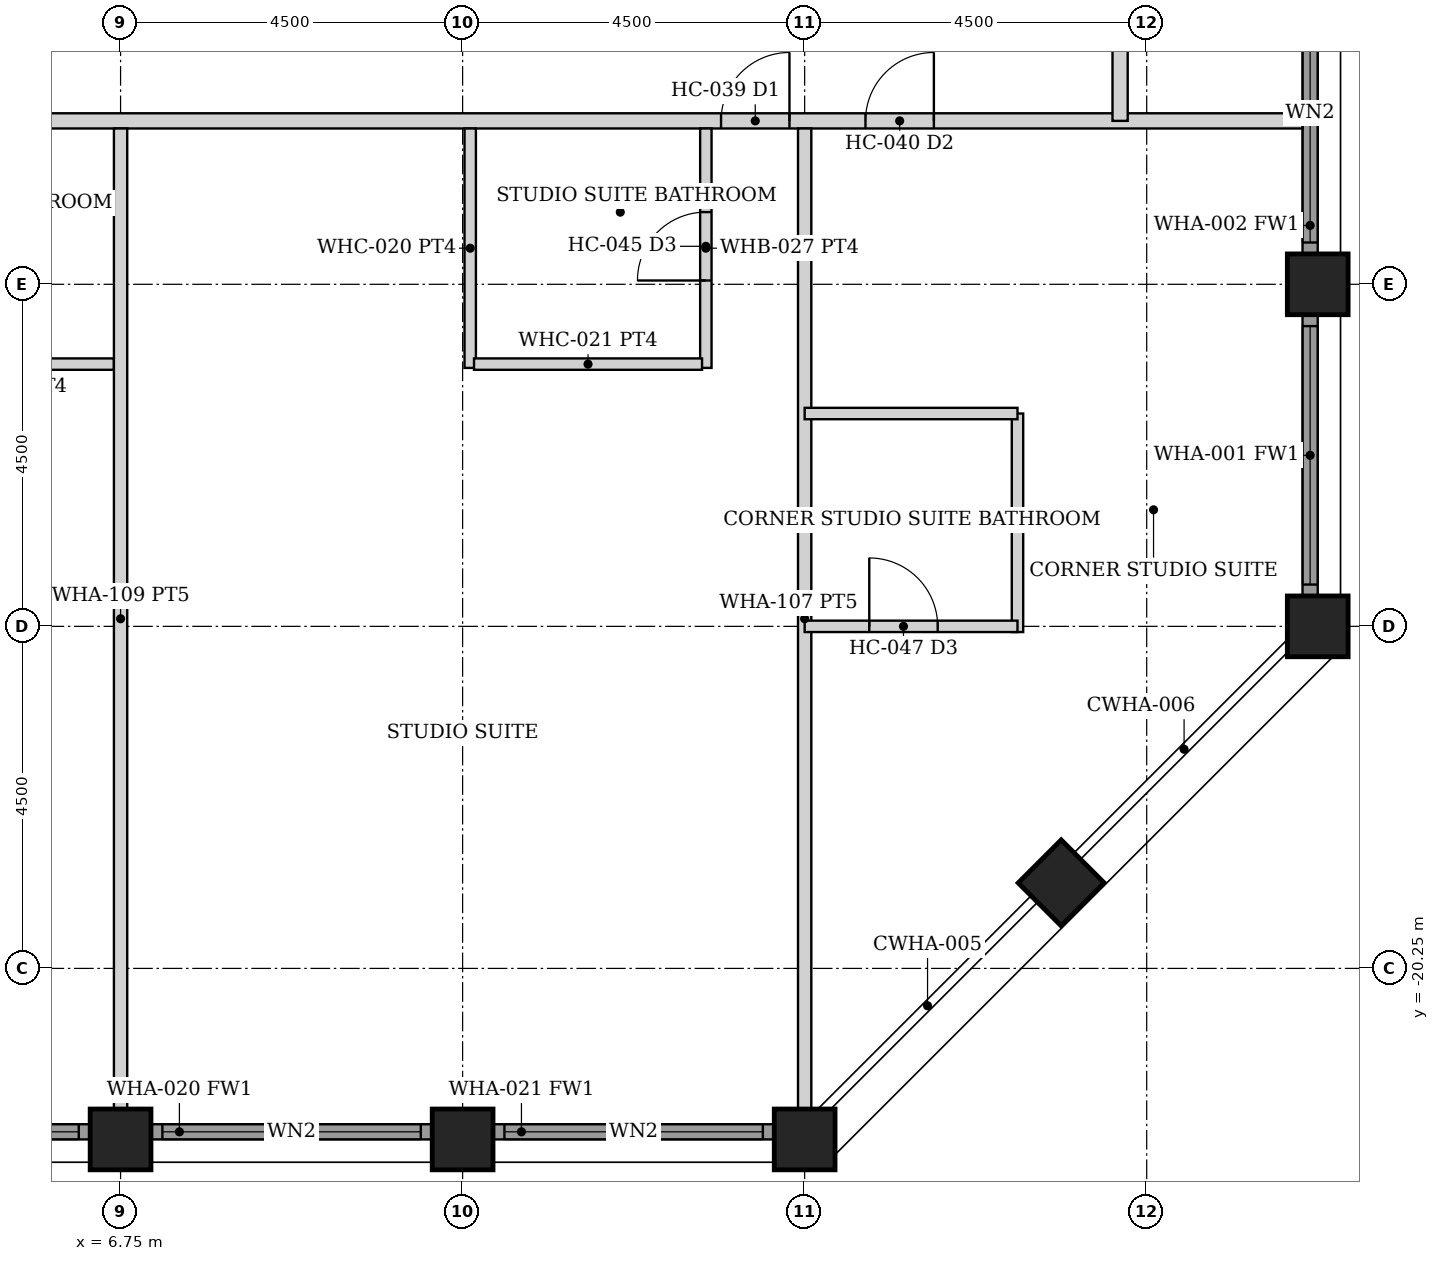
"""IFC4 building model, lengths in metres.
Left out: names, types, materials, properties, quantities, classifications, styles, units other than length and angle.
Written with IfcOpenShell. Run it as: python <this file> out.ifc"""

import sys

from ifc_helpers import new_model, si_unit, direction, frame, frame_2d, origin, origin_2d, place, context, subcontext, project, spatial, rectangle, hollow_rectangle, extrude, element, fill, save


model = new_model("IFC4")
c1 = context("Model", 3, precision=1e-05, world=origin(), true_north=direction((0.0, 1.0)))
c2 = subcontext(c1, "Body", "Model", "MODEL_VIEW")
j1 = project(units=[si_unit("LENGTHUNIT", "METRE"), si_unit("PLANEANGLEUNIT", "RADIAN")], contexts=[c1])
p1 = place(None, origin())
s1 = spatial("IfcSite", under=j1, at=p1, CompositionType="ELEMENT")
p2 = place(p1, origin())
s2 = spatial("IfcBuilding", under=s1, at=p2, CompositionType="ELEMENT")
p3 = place(p2, frame((0.0, 0.0, 140.0)))
s3 = spatial("IfcBuildingStorey", under=s2, at=p3, CompositionType="ELEMENT", Elevation=140.0)
for number, where, z_axis, x_axis in (
    (1, (22.5, -15.75, 0.0), (0.0, 0.0, 1.0), (1.0, 0.0, 0.0)),
    (2, (22.5, -11.25, 0.0), (0.0, 0.0, 1.0), (1.0, 0.0, 0.0)),
    (3, (6.75, -22.5, 0.0), (0.0, 0.0, 1.0), (0.0, 1.0, 0.0)),
    (4, (11.25, -22.5, 0.0), (0.0, 0.0, 1.0), (0.0, 1.0, 0.0)),
    (5, (15.75, -22.5, 0.0), (0.0, 0.0, 1.0), (0.0, 1.0, 0.0)),
    (6, (19.125, -19.125, 0.0), (0.0, 0.0, 1.0), (0.707, -0.707, 0.0)),
):
    element("IfcColumn", number, at=place(p3, frame(where, z_axis=z_axis, x_axis=x_axis)), inside=s3, PredefinedType="COLUMN", context=c2, shape_type="SweptSolid", body=[
        extrude(hollow_rectangle(XDim=0.8, YDim=0.8, WallThickness=0.05, at=origin_2d()), origin(), (0.0, 0.0, 1.0), 3.6),
    ])
p4 = place(p3, frame((2.655, -22.4, 0.0), z_axis=(0.0, 0.0, 1.0), x_axis=(1.0, 0.0, 0.0)))
e7 = element("IfcWall", 7, at=p4, inside=s3, PredefinedType="SOLIDWALL", context=c2, shape_type="SweptSolid", body=[
    extrude(rectangle(XDim=3.69, YDim=0.2, at=frame_2d((1.845, 0.0))), origin(), (0.0, 0.0, 1.0), 2.479),
])
p5 = place(p4, frame((0.145, 0.0, 0.3)))
e8 = element("IfcOpeningElement", 8, at=p5, cuts=e7, PredefinedType="OPENING", context=c2, shape_type="SweptSolid", body=[
    extrude(rectangle(XDim=3.4, YDim=2.029, at=frame_2d((1.7, 1.015))), frame((0.0, 0.11, 0.0), z_axis=(0.0, -1.0, 0.0), x_axis=(1.0, 0.0, 0.0)), (0.0, 0.0, 1.0), 0.22),
])
p6 = place(p3, frame((7.155, -22.4, 0.0), z_axis=(0.0, 0.0, 1.0), x_axis=(1.0, 0.0, 0.0)))
e9 = element("IfcWall", 9, at=p6, inside=s3, PredefinedType="SOLIDWALL", context=c2, shape_type="SweptSolid", body=[
    extrude(rectangle(XDim=3.69, YDim=0.2, at=frame_2d((1.845, 0.0))), origin(), (0.0, 0.0, 1.0), 2.479),
])
p7 = place(p6, frame((0.145, 0.0, 0.3)))
e10 = element("IfcOpeningElement", 10, at=p7, cuts=e9, PredefinedType="OPENING", context=c2, shape_type="SweptSolid", body=[
    extrude(rectangle(XDim=3.4, YDim=2.029, at=frame_2d((1.7, 1.015))), frame((0.0, 0.11, 0.0), z_axis=(0.0, -1.0, 0.0), x_axis=(1.0, 0.0, 0.0)), (0.0, 0.0, 1.0), 0.22),
])
p8 = place(p3, frame((11.655, -22.4, 0.0), z_axis=(0.0, 0.0, 1.0), x_axis=(1.0, 0.0, 0.0)))
e11 = element("IfcWall", 11, at=p8, inside=s3, PredefinedType="SOLIDWALL", context=c2, shape_type="SweptSolid", body=[
    extrude(rectangle(XDim=3.69, YDim=0.2, at=frame_2d((1.845, 0.0))), origin(), (0.0, 0.0, 1.0), 2.479),
])
p9 = place(p8, frame((0.145, 0.0, 0.3)))
e12 = element("IfcOpeningElement", 12, at=p9, cuts=e11, PredefinedType="OPENING", context=c2, shape_type="SweptSolid", body=[
    extrude(rectangle(XDim=3.4, YDim=2.029, at=frame_2d((1.7, 1.015))), frame((0.0, 0.11, 0.0), z_axis=(0.0, -1.0, 0.0), x_axis=(1.0, 0.0, 0.0)), (0.0, 0.0, 1.0), 0.22),
])
p10 = place(p3, frame((22.4, -15.345, 0.0), z_axis=(0.0, 0.0, 1.0), x_axis=(0.0, 1.0, 0.0)))
e13 = element("IfcWall", 13, at=p10, inside=s3, PredefinedType="SOLIDWALL", context=c2, shape_type="SweptSolid", body=[
    extrude(rectangle(XDim=3.69, YDim=0.2, at=frame_2d((1.845, 0.0))), origin(), (0.0, 0.0, 1.0), 2.479),
])
p11 = place(p10, frame((0.145, 0.0, 0.3)))
e14 = element("IfcOpeningElement", 14, at=p11, cuts=e13, PredefinedType="OPENING", context=c2, shape_type="SweptSolid", body=[
    extrude(rectangle(XDim=3.4, YDim=2.029, at=frame_2d((1.7, 1.015))), frame((0.0, 0.11, 0.0), z_axis=(0.0, -1.0, 0.0), x_axis=(1.0, 0.0, 0.0)), (0.0, 0.0, 1.0), 0.22),
])
p12 = place(p3, frame((22.4, -10.845, 0.0), z_axis=(0.0, 0.0, 1.0), x_axis=(0.0, 1.0, 0.0)))
e15 = element("IfcWall", 15, at=p12, inside=s3, PredefinedType="SOLIDWALL", context=c2, shape_type="SweptSolid", body=[
    extrude(rectangle(XDim=3.69, YDim=0.2, at=frame_2d((1.845, 0.0))), origin(), (0.0, 0.0, 1.0), 2.479),
])
p13 = place(p12, frame((0.145, 0.0, 0.3)))
e16 = element("IfcOpeningElement", 16, at=p13, cuts=e15, PredefinedType="OPENING", context=c2, shape_type="SweptSolid", body=[
    extrude(rectangle(XDim=3.4, YDim=2.029, at=frame_2d((1.7, 1.015))), frame((0.0, 0.11, 0.0), z_axis=(0.0, -1.0, 0.0), x_axis=(1.0, 0.0, 0.0)), (0.0, 0.0, 1.0), 0.22),
])
p14 = place(p3, frame((-22.3, -9.1, 0.0), z_axis=(0.0, 0.0, 1.0), x_axis=(1.0, 0.0, 0.0)))
e17 = element("IfcWall", 17, at=p14, inside=s3, PredefinedType="PARTITIONING", context=c2, shape_type="SweptSolid", body=[
    extrude(rectangle(XDim=44.6, YDim=0.2, at=frame_2d((22.3, 0.0))), origin(), (0.0, 0.0, 1.0), 2.473),
])
p15 = place(p14, frame((6.75, 0.0, 0.0)))
e18 = element("IfcOpeningElement", 18, at=p15, cuts=e17, PredefinedType="OPENING", context=c2, shape_type="SweptSolid", body=[
    extrude(rectangle(XDim=0.9, YDim=2.1, at=frame_2d((0.45, 1.05))), frame((0.0, 0.11, 0.0), z_axis=(0.0, -1.0, 0.0), x_axis=(1.0, 0.0, 0.0)), (0.0, 0.0, 1.0), 0.22),
])
p16 = place(p14, frame((14.45, 0.0, 0.0)))
e19 = element("IfcOpeningElement", 19, at=p16, cuts=e17, PredefinedType="OPENING", context=c2, shape_type="SweptSolid", body=[
    extrude(rectangle(XDim=0.9, YDim=2.1, at=frame_2d((0.45, 1.05))), frame((0.0, 0.11, 0.0), z_axis=(0.0, -1.0, 0.0), x_axis=(1.0, 0.0, 0.0)), (0.0, 0.0, 1.0), 0.22),
])
p17 = place(p14, frame((15.75, 0.0, 0.0)))
e20 = element("IfcOpeningElement", 20, at=p17, cuts=e17, PredefinedType="OPENING", context=c2, shape_type="SweptSolid", body=[
    extrude(rectangle(XDim=0.9, YDim=2.1, at=frame_2d((0.45, 1.05))), frame((0.0, 0.11, 0.0), z_axis=(0.0, -1.0, 0.0), x_axis=(1.0, 0.0, 0.0)), (0.0, 0.0, 1.0), 0.22),
])
p18 = place(p14, frame((24.75, 0.0, 0.0)))
e21 = element("IfcOpeningElement", 21, at=p18, cuts=e17, PredefinedType="OPENING", context=c2, shape_type="SweptSolid", body=[
    extrude(rectangle(XDim=0.9, YDim=2.1, at=frame_2d((0.45, 1.05))), frame((0.0, 0.11, 0.0), z_axis=(0.0, -1.0, 0.0), x_axis=(1.0, 0.0, 0.0)), (0.0, 0.0, 1.0), 0.22),
])
p19 = place(p14, frame((36.95, 0.0, 0.0)))
e22 = element("IfcOpeningElement", 22, at=p19, cuts=e17, PredefinedType="OPENING", context=c2, shape_type="SweptSolid", body=[
    extrude(rectangle(XDim=0.9, YDim=2.1, at=frame_2d((0.45, 1.05))), frame((0.0, 0.11, 0.0), z_axis=(0.0, -1.0, 0.0), x_axis=(1.0, 0.0, 0.0)), (0.0, 0.0, 1.0), 0.22),
])
p20 = place(p14, frame((38.85, 0.0, 0.0)))
e23 = element("IfcOpeningElement", 23, at=p20, cuts=e17, PredefinedType="OPENING", context=c2, shape_type="SweptSolid", body=[
    extrude(rectangle(XDim=0.9, YDim=2.1, at=frame_2d((0.45, 1.05))), frame((0.0, 0.11, 0.0), z_axis=(0.0, -1.0, 0.0), x_axis=(1.0, 0.0, 0.0)), (0.0, 0.0, 1.0), 0.22),
])
p21 = place(p14, frame((4.85, 0.0, 0.0)))
e24 = element("IfcOpeningElement", 24, at=p21, cuts=e17, PredefinedType="OPENING", context=c2, shape_type="SweptSolid", body=[
    extrude(rectangle(XDim=0.9, YDim=2.1, at=frame_2d((0.45, 1.05))), frame((0.0, 0.11, 0.0), z_axis=(0.0, -1.0, 0.0), x_axis=(1.0, 0.0, 0.0)), (0.0, 0.0, 1.0), 0.22),
])
p22 = place(p3, frame((19.9, -9.1, 0.0), z_axis=(0.0, 0.0, 1.0), x_axis=(0.0, 1.0, 0.0)))
e25 = element("IfcWall", 25, at=p22, inside=s3, PredefinedType="PARTITIONING", context=c2, shape_type="SweptSolid", body=[
    extrude(rectangle(XDim=18.2, YDim=0.2, at=frame_2d((9.1, 0.0))), origin(), (0.0, 0.0, 1.0), 2.473),
])
p23 = place(p22, frame((8.6, 0.0, 0.0)))
e26 = element("IfcOpeningElement", 26, at=p23, cuts=e25, PredefinedType="OPENING", context=c2, shape_type="SweptSolid", body=[
    extrude(rectangle(XDim=1.0, YDim=2.1, at=frame_2d((0.5, 1.05))), frame((0.0, 0.11, 0.0), z_axis=(0.0, -1.0, 0.0), x_axis=(1.0, 0.0, 0.0)), (0.0, 0.0, 1.0), 0.22),
])
p24 = place(p3, frame((3.6, -12.3, 0.0), z_axis=(0.0, 0.0, 1.0), x_axis=(1.0, 0.0, 0.0)))
e27 = element("IfcWall", 27, at=p24, inside=s3, PredefinedType="PARTITIONING", context=c2, shape_type="SweptSolid", body=[
    extrude(rectangle(XDim=3.062, YDim=0.15, at=frame_2d((1.531, 0.0))), origin(), (0.0, 0.0, 1.0), 2.473),
])
p25 = place(p3, frame((14.45, -12.35, 0.0), z_axis=(0.0, 0.0, 1.0), x_axis=(0.0, 1.0, 0.0)))
e28 = element("IfcWall", 28, at=p25, inside=s3, PredefinedType="PARTITIONING", context=c2, shape_type="SweptSolid", body=[
    extrude(rectangle(XDim=3.15, YDim=0.15, at=frame_2d((1.575, 0.0))), origin(), (0.0, 0.0, 1.0), 2.473),
])
p26 = place(p25, frame((1.15, 0.0, 0.0)))
e29 = element("IfcOpeningElement", 29, at=p26, cuts=e28, PredefinedType="OPENING", context=c2, shape_type="SweptSolid", body=[
    extrude(rectangle(XDim=0.9, YDim=2.1, at=frame_2d((0.45, 1.05))), frame((0.0, 0.085, 0.0), z_axis=(0.0, -1.0, 0.0), x_axis=(1.0, 0.0, 0.0)), (0.0, 0.0, 1.0), 0.17),
])
p27 = place(p3, frame((11.35, -12.35, 0.0), z_axis=(0.0, 0.0, 1.0), x_axis=(0.0, 1.0, 0.0)))
e30 = element("IfcWall", 30, at=p27, inside=s3, PredefinedType="PARTITIONING", context=c2, shape_type="SweptSolid", body=[
    extrude(rectangle(XDim=3.15, YDim=0.15, at=frame_2d((1.575, 0.0))), origin(), (0.0, 0.0, 1.0), 2.473),
])
p28 = place(p3, frame((11.4, -12.3, 0.0), z_axis=(0.0, 0.0, 1.0), x_axis=(1.0, 0.0, 0.0)))
e31 = element("IfcWall", 31, at=p28, inside=s3, PredefinedType="PARTITIONING", context=c2, shape_type="SweptSolid", body=[
    extrude(rectangle(XDim=3.0, YDim=0.15, at=frame_2d((1.5, 0.0))), origin(), (0.0, 0.0, 1.0), 2.473),
])
for number, where, z_axis, x_axis in (
    (32, (6.75, -22.1, 0.0), (0.0, 0.0, 1.0), (0.0, 1.0, 0.0)),
    (33, (15.75, -22.1, 0.0), (0.0, 0.0, 1.0), (0.0, 1.0, 0.0)),
):
    element("IfcWall", number, at=place(p3, frame(where, z_axis=z_axis, x_axis=x_axis)), inside=s3, PredefinedType="PARTITIONING", context=c2, shape_type="SweptSolid", body=[
        extrude(rectangle(XDim=12.9, YDim=0.175, at=frame_2d((6.45, 0.0))), origin(), (0.0, 0.0, 1.0), 2.473),
    ])
p29 = place(p3, frame((18.55, -15.825, 0.0), z_axis=(0.0, 0.0, 1.0), x_axis=(0.0, 1.0, 0.0)))
e34 = element("IfcWall", 34, at=p29, inside=s3, PredefinedType="PARTITIONING", context=c2, shape_type="SweptSolid", body=[
    extrude(rectangle(XDim=2.875, YDim=0.15, at=frame_2d((1.438, 0.0))), origin(), (0.0, 0.0, 1.0), 2.473),
])
p30 = place(p3, frame((15.75, -12.95, 0.0), z_axis=(0.0, 0.0, 1.0), x_axis=(1.0, 0.0, 0.0)))
e35 = element("IfcWall", 35, at=p30, inside=s3, PredefinedType="PARTITIONING", context=c2, shape_type="SweptSolid", body=[
    extrude(rectangle(XDim=2.8, YDim=0.15, at=frame_2d((1.4, 0.0))), origin(), (0.0, 0.0, 1.0), 2.473),
])
p31 = place(p3, frame((15.75, -15.75, 0.0), z_axis=(0.0, 0.0, 1.0), x_axis=(1.0, 0.0, 0.0)))
e36 = element("IfcWall", 36, at=p31, inside=s3, PredefinedType="PARTITIONING", context=c2, shape_type="SweptSolid", body=[
    extrude(rectangle(XDim=2.8, YDim=0.15, at=frame_2d((1.4, 0.0))), origin(), (0.0, 0.0, 1.0), 2.473),
])
p32 = place(p31, frame((0.85, 0.0, 0.0)))
e37 = element("IfcOpeningElement", 37, at=p32, cuts=e36, PredefinedType="OPENING", context=c2, shape_type="SweptSolid", body=[
    extrude(rectangle(XDim=0.9, YDim=2.1, at=frame_2d((0.45, 1.05))), frame((0.0, 0.085, 0.0), z_axis=(0.0, -1.0, 0.0), x_axis=(1.0, 0.0, 0.0)), (0.0, 0.0, 1.0), 0.17),
])
p33 = place(p5, origin())
e38 = element("IfcWindow", 38, at=p33, inside=s3, PartitioningType="SINGLE_PANEL", PredefinedType="WINDOW", context=c2, shape_type="SweptSolid", body=[
    extrude(rectangle(XDim=3.4, YDim=2.029, at=frame_2d((1.7, 1.015))), frame((0.0, 0.03, 0.0), z_axis=(0.0, -1.0, 0.0), x_axis=(1.0, 0.0, 0.0)), (0.0, 0.0, 1.0), 0.06),
])
fill(e8, e38)
p34 = place(p7, origin())
e39 = element("IfcWindow", 39, at=p34, inside=s3, PartitioningType="SINGLE_PANEL", PredefinedType="WINDOW", context=c2, shape_type="SweptSolid", body=[
    extrude(rectangle(XDim=3.4, YDim=2.029, at=frame_2d((1.7, 1.015))), frame((0.0, 0.03, 0.0), z_axis=(0.0, -1.0, 0.0), x_axis=(1.0, 0.0, 0.0)), (0.0, 0.0, 1.0), 0.06),
])
fill(e10, e39)
p35 = place(p9, origin())
e40 = element("IfcWindow", 40, at=p35, inside=s3, PartitioningType="SINGLE_PANEL", PredefinedType="WINDOW", context=c2, shape_type="SweptSolid", body=[
    extrude(rectangle(XDim=3.4, YDim=2.029, at=frame_2d((1.7, 1.015))), frame((0.0, 0.03, 0.0), z_axis=(0.0, -1.0, 0.0), x_axis=(1.0, 0.0, 0.0)), (0.0, 0.0, 1.0), 0.06),
])
fill(e12, e40)
p36 = place(p11, origin())
e41 = element("IfcWindow", 41, at=p36, inside=s3, PartitioningType="SINGLE_PANEL", PredefinedType="WINDOW", context=c2, shape_type="SweptSolid", body=[
    extrude(rectangle(XDim=3.4, YDim=2.029, at=frame_2d((1.7, 1.015))), frame((0.0, 0.03, 0.0), z_axis=(0.0, -1.0, 0.0), x_axis=(1.0, 0.0, 0.0)), (0.0, 0.0, 1.0), 0.06),
])
fill(e14, e41)
p37 = place(p13, origin())
e42 = element("IfcWindow", 42, at=p37, inside=s3, PartitioningType="SINGLE_PANEL", PredefinedType="WINDOW", context=c2, shape_type="SweptSolid", body=[
    extrude(rectangle(XDim=3.4, YDim=2.029, at=frame_2d((1.7, 1.015))), frame((0.0, 0.03, 0.0), z_axis=(0.0, -1.0, 0.0), x_axis=(1.0, 0.0, 0.0)), (0.0, 0.0, 1.0), 0.06),
])
fill(e16, e42)
p38 = place(p19, origin())
e43 = element("IfcDoor", 43, at=p38, inside=s3, OperationType="SINGLE_SWING_RIGHT", PredefinedType="DOOR", context=c2, shape_type="SweptSolid", body=[
    extrude(rectangle(XDim=0.9, YDim=2.1, at=frame_2d((0.45, 1.05))), frame((0.0, 0.025, 0.0), z_axis=(0.0, -1.0, 0.0), x_axis=(1.0, 0.0, 0.0)), (0.0, 0.0, 1.0), 0.05),
])
fill(e22, e43)
p39 = place(p26, origin())
e44 = element("IfcDoor", 44, at=p39, inside=s3, OperationType="SINGLE_SWING_LEFT", PredefinedType="DOOR", context=c2, shape_type="SweptSolid", body=[
    extrude(rectangle(XDim=0.9, YDim=2.1, at=frame_2d((0.45, 1.05))), frame((0.0, 0.025, 0.0), z_axis=(0.0, -1.0, 0.0), x_axis=(1.0, 0.0, 0.0)), (0.0, 0.0, 1.0), 0.05),
])
fill(e29, e44)
p40 = place(p20, origin())
e45 = element("IfcDoor", 45, at=p40, inside=s3, OperationType="SINGLE_SWING_RIGHT", PredefinedType="DOOR", context=c2, shape_type="SweptSolid", body=[
    extrude(rectangle(XDim=0.9, YDim=2.1, at=frame_2d((0.45, 1.05))), frame((0.0, 0.025, 0.0), z_axis=(0.0, -1.0, 0.0), x_axis=(1.0, 0.0, 0.0)), (0.0, 0.0, 1.0), 0.05),
])
fill(e23, e45)
p41 = place(p32, origin())
e46 = element("IfcDoor", 46, at=p41, inside=s3, OperationType="SINGLE_SWING_LEFT", PredefinedType="DOOR", context=c2, shape_type="SweptSolid", body=[
    extrude(rectangle(XDim=0.9, YDim=2.1, at=frame_2d((0.45, 1.05))), frame((0.0, 0.025, 0.0), z_axis=(0.0, -1.0, 0.0), x_axis=(1.0, 0.0, 0.0)), (0.0, 0.0, 1.0), 0.05),
])
fill(e37, e46)
save(model, sys.argv[1])
